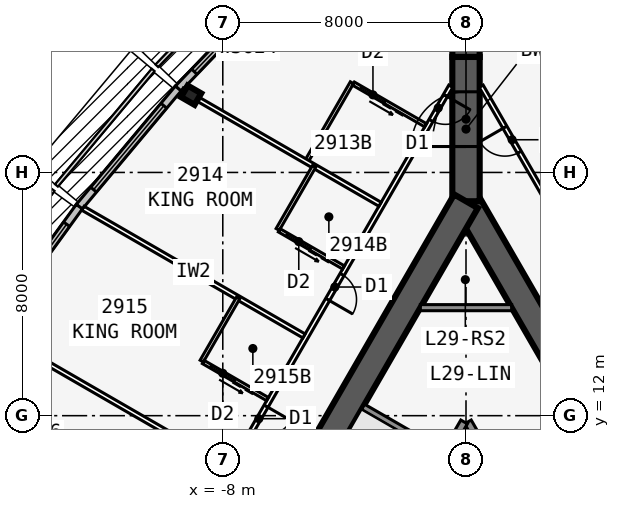
"""IFC4 building model, lengths in metres.
Left out: names, types, materials, properties, quantities, classifications, styles, units other than length and angle.
Written with IfcOpenShell. Run it as: python <this file> out.ifc"""

import sys

from ifc_helpers import new_model, si_unit, direction, frame, frame_2d, origin, origin_2d, place, context, subcontext, project, spatial, rectangle, i_section, extrude, element, fill, save


model = new_model("IFC4")
c1 = context("Model", 3, precision=1e-05, world=origin(), true_north=direction((0.0, 1.0)))
c2 = subcontext(c1, "Body", "Model", "MODEL_VIEW")
j1 = project(units=[si_unit("LENGTHUNIT", "METRE"), si_unit("PLANEANGLEUNIT", "RADIAN")], contexts=[c1])
p1 = place(None, origin())
s1 = spatial("IfcSite", under=j1, at=p1, CompositionType="ELEMENT")
p2 = place(p1, origin())
s2 = spatial("IfcBuilding", under=s1, at=p2, CompositionType="ELEMENT")
p3 = place(p2, frame((0.0, 0.0, 114.7)))
s3 = spatial("IfcBuildingStorey", under=s2, at=p3, CompositionType="ELEMENT", Elevation=114.7)
p4 = place(p3, frame((16.5, -9.526, 0.0), z_axis=(0.0, 0.0, 1.0), x_axis=(-0.499999749417, 0.866025548458, 0.0)))
e1 = element("IfcWall", 1, at=p4, inside=s3, PredefinedType="SHEAR", context=c2, shape_type="SweptSolid", body=[
    extrude(rectangle(XDim=33.0, YDim=0.9, at=frame_2d((16.5, 0.0))), origin(), (0.0, 0.0, 1.0), 3.4),
])
p5 = place(p4, frame((14.15, 0.0, 0.0)))
e2 = element("IfcOpeningElement", 2, at=p5, cuts=e1, PredefinedType="OPENING", context=c2, shape_type="SweptSolid", body=[
    extrude(rectangle(XDim=1.8, YDim=2.13, at=frame_2d((0.9, 1.065))), frame((0.0, 0.46, 0.0), z_axis=(0.0, -1.0, 0.0), x_axis=(1.0, 0.0, 0.0)), (0.0, 0.0, 1.0), 0.92),
])
p6 = place(p4, frame((12.6, 0.0, 0.0)))
e3 = element("IfcOpeningElement", 3, at=p6, cuts=e1, PredefinedType="OPENING", context=c2, shape_type="SweptSolid", body=[
    extrude(rectangle(XDim=1.0, YDim=2.13, at=frame_2d((0.5, 1.065))), frame((0.0, 0.46, 0.0), z_axis=(0.0, -1.0, 0.0), x_axis=(1.0, 0.0, 0.0)), (0.0, 0.0, 1.0), 0.92),
])
p7 = place(p3, frame((5.379, 2.586, 0.0), z_axis=(0.0, 0.0, 1.0), x_axis=(-0.500001375892, 0.866024609411, 0.0)))
e4 = element("IfcWall", 4, at=p7, inside=s3, PredefinedType="SOLIDWALL", context=c2, shape_type="SweptSolid", body=[
    extrude(rectangle(XDim=10.633, YDim=0.25, at=frame_2d((5.316, 0.0))), origin(), (0.0, 0.0, 1.0), 3.235),
])
p8 = place(p7, frame((9.164, 0.0, 0.0)))
e5 = element("IfcOpeningElement", 5, at=p8, cuts=e4, PredefinedType="OPENING", context=c2, shape_type="SweptSolid", body=[
    extrude(rectangle(XDim=0.9, YDim=2.13, at=frame_2d((0.45, 1.065))), frame((0.0, 0.135, 0.0), z_axis=(0.0, -1.0, 0.0), x_axis=(1.0, 0.0, 0.0)), (0.0, 0.0, 1.0), 0.27),
])
p9 = place(p7, frame((1.0, 0.0, 0.0)))
e6 = element("IfcOpeningElement", 6, at=p9, cuts=e4, PredefinedType="OPENING", context=c2, shape_type="SweptSolid", body=[
    extrude(rectangle(XDim=1.1, YDim=2.13, at=frame_2d((0.55, 1.065))), frame((0.0, 0.135, 0.0), z_axis=(0.0, -1.0, 0.0), x_axis=(1.0, 0.0, 0.0)), (0.0, 0.0, 1.0), 0.27),
])
p10 = place(p7, frame((3.9, 0.0, 0.0)))
e7 = element("IfcOpeningElement", 7, at=p10, cuts=e4, PredefinedType="OPENING", context=c2, shape_type="SweptSolid", body=[
    extrude(rectangle(XDim=1.1, YDim=2.13, at=frame_2d((0.55, 1.065))), frame((0.0, 0.135, 0.0), z_axis=(0.0, -1.0, 0.0), x_axis=(1.0, 0.0, 0.0)), (0.0, 0.0, 1.0), 0.27),
])
p11 = place(p7, frame((6.8, 0.0, 0.0)))
e8 = element("IfcOpeningElement", 8, at=p11, cuts=e4, PredefinedType="OPENING", context=c2, shape_type="SweptSolid", body=[
    extrude(rectangle(XDim=1.1, YDim=2.13, at=frame_2d((0.55, 1.065))), frame((0.0, 0.135, 0.0), z_axis=(0.0, -1.0, 0.0), x_axis=(1.0, 0.0, 0.0)), (0.0, 0.0, 1.0), 0.27),
])
p12 = place(p3, frame((0.979, 10.207, 0.0), z_axis=(0.0, 0.0, 1.0), x_axis=(0.866022959057, 0.500004234368, 0.0)))
e9 = element("IfcWall", 9, at=p12, inside=s3, PredefinedType="SOLIDWALL", context=c2, shape_type="SweptSolid", body=[
    extrude(rectangle(XDim=3.125, YDim=0.2, at=frame_2d((1.562, 0.0))), origin(), (0.0, 0.0, 1.0), 3.235),
])
p13 = place(p3, frame((0.0, 19.052, 0.0), z_axis=(0.0, 0.0, 1.0), x_axis=(-0.499999749417, -0.866025548458, 0.0)))
e10 = element("IfcWall", 10, at=p13, inside=s3, PredefinedType="SHEAR", context=c2, shape_type="SweptSolid", body=[
    extrude(rectangle(XDim=33.0, YDim=0.9, at=frame_2d((16.5, 0.0))), origin(), (0.0, 0.0, 1.0), 3.4),
])
p14 = place(p13, frame((14.15, 0.0, 0.0)))
e11 = element("IfcOpeningElement", 11, at=p14, cuts=e10, PredefinedType="OPENING", context=c2, shape_type="SweptSolid", body=[
    extrude(rectangle(XDim=1.8, YDim=2.13, at=frame_2d((0.9, 1.065))), frame((0.0, 0.46, 0.0), z_axis=(0.0, -1.0, 0.0), x_axis=(1.0, 0.0, 0.0)), (0.0, 0.0, 1.0), 0.92),
])
p15 = place(p13, frame((12.6, 0.0, 0.0)))
e12 = element("IfcOpeningElement", 12, at=p15, cuts=e10, PredefinedType="OPENING", context=c2, shape_type="SweptSolid", body=[
    extrude(rectangle(XDim=1.0, YDim=2.13, at=frame_2d((0.5, 1.065))), frame((0.0, 0.46, 0.0), z_axis=(0.0, -1.0, 0.0), x_axis=(1.0, 0.0, 0.0)), (0.0, 0.0, 1.0), 0.92),
])
p16 = place(p3, frame((-0.062, 11.794, 0.0), z_axis=(0.0, 0.0, 1.0), x_axis=(-0.500006680225, -0.86602154692, 0.0)))
e13 = element("IfcWall", 13, at=p16, inside=s3, PredefinedType="SOLIDWALL", context=c2, shape_type="SweptSolid", body=[
    extrude(rectangle(XDim=7.733, YDim=0.25, at=frame_2d((3.866, 0.0))), origin(), (0.0, 0.0, 1.0), 3.235),
])
p17 = place(p3, frame((-0.679, 10.727, 0.0), z_axis=(0.0, 0.0, 1.0), x_axis=(-0.866022959057, 0.500004234368, 0.0)))
e14 = element("IfcWall", 14, at=p17, inside=s3, PredefinedType="SOLIDWALL", context=c2, shape_type="SweptSolid", body=[
    extrude(rectangle(XDim=3.125, YDim=0.2, at=frame_2d((1.562, 0.0))), origin(), (0.0, 0.0, 1.0), 3.235),
])
p18 = place(p3, frame((0.0, 19.052, 0.0), z_axis=(0.0, 0.0, 1.0), x_axis=(0.0, 1.0, 0.0)))
e15 = element("IfcWall", 15, at=p18, inside=s3, PredefinedType="SHEAR", context=c2, shape_type="SweptSolid", body=[
    extrude(rectangle(XDim=4.746, YDim=0.9, at=frame_2d((2.373, 0.0))), origin(), (0.0, 0.0, 1.0), 3.4),
])
p19 = place(p18, frame((1.8, 0.0, 0.0)))
e16 = element("IfcOpeningElement", 16, at=p19, cuts=e15, PredefinedType="OPENING", context=c2, shape_type="SweptSolid", body=[
    extrude(rectangle(XDim=1.8, YDim=2.13, at=frame_2d((0.9, 1.065))), frame((0.0, 0.46, 0.0), z_axis=(0.0, -1.0, 0.0), x_axis=(1.0, 0.0, 0.0)), (0.0, 0.0, 1.0), 0.92),
])
p20 = place(p3, frame((0.0, 23.799, 0.0), z_axis=(0.0, 0.0, 1.0), x_axis=(0.0, 1.0, 0.0)))
e17 = element("IfcWall", 17, at=p20, inside=s3, PredefinedType="SHEAR", context=c2, shape_type="SweptSolid", body=[
    extrude(rectangle(XDim=1.155, YDim=0.9, at=frame_2d((0.577, 0.0))), origin(), (0.0, 0.0, 1.0), 3.4),
])
p21 = place(p3, frame((-9.041, 22.541, 0.0), z_axis=(0.0, 0.0, 1.0), x_axis=(-0.5, -0.866025403784, 0.0)))
e18 = element("IfcColumn", 18, at=p21, inside=s3, PredefinedType="COLUMN", context=c2, shape_type="SweptSolid", body=[
    extrude(i_section(OverallWidth=0.437, OverallDepth=0.513, WebThickness=0.061, FlangeThickness=0.097, at=origin_2d()), origin(), (0.0, 0.0, 1.0), 3.4),
])
p22 = place(p3, frame((-5.91, 26.472, 0.0), z_axis=(0.0, 0.0, 1.0), x_axis=(-0.691719937936, -0.722165858693, 0.0)))
e19 = element("IfcWall", 19, at=p22, inside=s3, PredefinedType="STANDARD", context=c2, shape_type="SweptSolid", body=[
    extrude(rectangle(XDim=5.148, YDim=0.25, at=frame_2d((2.574, 0.0))), origin(), (0.0, 0.0, 1.0), 3.235),
])
p23 = place(p22, frame((0.774, 0.0, 0.45)))
e20 = element("IfcOpeningElement", 20, at=p23, cuts=e19, PredefinedType="OPENING", context=c2, shape_type="SweptSolid", body=[
    extrude(rectangle(XDim=3.6, YDim=2.4, at=frame_2d((1.8, 1.2))), frame((0.0, 0.135, 0.0), z_axis=(0.0, -1.0, 0.0), x_axis=(1.0, 0.0, 0.0)), (0.0, 0.0, 1.0), 0.27),
])
p24 = place(p3, frame((-9.465, 22.76, 0.0), z_axis=(0.0, 0.0, 1.0), x_axis=(-0.641810386606, -0.766863369607, 0.0)))
e21 = element("IfcWall", 21, at=p24, inside=s3, PredefinedType="STANDARD", context=c2, shape_type="SweptSolid", body=[
    extrude(rectangle(XDim=5.076, YDim=0.25, at=frame_2d((2.538, 0.0))), origin(), (0.0, 0.0, 1.0), 3.235),
])
p25 = place(p24, frame((0.738, 0.0, 0.45)))
e22 = element("IfcOpeningElement", 22, at=p25, cuts=e21, PredefinedType="OPENING", context=c2, shape_type="SweptSolid", body=[
    extrude(rectangle(XDim=3.6, YDim=2.4, at=frame_2d((1.8, 1.2))), frame((0.0, 0.135, 0.0), z_axis=(0.0, -1.0, 0.0), x_axis=(1.0, 0.0, 0.0)), (0.0, 0.0, 1.0), 0.27),
])
p26 = place(p3, frame((-12.718, 18.875, 0.0), z_axis=(0.0, 0.0, 1.0), x_axis=(-0.587669188412, -0.809101307001, 0.0)))
e23 = element("IfcWall", 23, at=p26, inside=s3, PredefinedType="STANDARD", context=c2, shape_type="SweptSolid", body=[
    extrude(rectangle(XDim=5.028, YDim=0.25, at=frame_2d((2.514, 0.0))), origin(), (0.0, 0.0, 1.0), 3.235),
])
p27 = place(p26, frame((0.714, 0.0, 0.45)))
e24 = element("IfcOpeningElement", 24, at=p27, cuts=e23, PredefinedType="OPENING", context=c2, shape_type="SweptSolid", body=[
    extrude(rectangle(XDim=3.6, YDim=2.4, at=frame_2d((1.8, 1.2))), frame((0.0, 0.135, 0.0), z_axis=(0.0, -1.0, 0.0), x_axis=(1.0, 0.0, 0.0)), (0.0, 0.0, 1.0), 0.27),
])
p28 = place(p3, frame((20.027, -10.985, 0.0), z_axis=(0.0, 0.0, 1.0), x_axis=(-0.500001677587, 0.866024435227, 0.0)))
e25 = element("IfcWall", 25, at=p28, inside=s3, PredefinedType="PARTITIONING", context=c2, shape_type="SweptSolid", body=[
    extrude(rectangle(XDim=39.054, YDim=0.15, at=frame_2d((19.527, 0.0))), origin(), (0.0, 0.0, 1.0), 3.235),
])
p29 = place(p28, frame((0.352, 0.0, 0.0)))
e26 = element("IfcOpeningElement", 26, at=p29, cuts=e25, PredefinedType="OPENING", context=c2, shape_type="SweptSolid", body=[
    extrude(rectangle(XDim=0.95, YDim=2.13, at=frame_2d((0.475, 1.065))), frame((0.0, 0.085, 0.0), z_axis=(0.0, -1.0, 0.0), x_axis=(1.0, 0.0, 0.0)), (0.0, 0.0, 1.0), 0.17),
])
p30 = place(p28, frame((7.752, 0.0, 0.0)))
e27 = element("IfcOpeningElement", 27, at=p30, cuts=e25, PredefinedType="OPENING", context=c2, shape_type="SweptSolid", body=[
    extrude(rectangle(XDim=0.95, YDim=2.13, at=frame_2d((0.475, 1.065))), frame((0.0, 0.085, 0.0), z_axis=(0.0, -1.0, 0.0), x_axis=(1.0, 0.0, 0.0)), (0.0, 0.0, 1.0), 0.17),
])
p31 = place(p28, frame((17.752, 0.0, 0.0)))
e28 = element("IfcOpeningElement", 28, at=p31, cuts=e25, PredefinedType="OPENING", context=c2, shape_type="SweptSolid", body=[
    extrude(rectangle(XDim=0.95, YDim=2.13, at=frame_2d((0.475, 1.065))), frame((0.0, 0.085, 0.0), z_axis=(0.0, -1.0, 0.0), x_axis=(1.0, 0.0, 0.0)), (0.0, 0.0, 1.0), 0.17),
])
p32 = place(p28, frame((22.152, 0.0, 0.0)))
e29 = element("IfcOpeningElement", 29, at=p32, cuts=e25, PredefinedType="OPENING", context=c2, shape_type="SweptSolid", body=[
    extrude(rectangle(XDim=0.95, YDim=2.13, at=frame_2d((0.475, 1.065))), frame((0.0, 0.085, 0.0), z_axis=(0.0, -1.0, 0.0), x_axis=(1.0, 0.0, 0.0)), (0.0, 0.0, 1.0), 0.17),
])
p33 = place(p28, frame((27.152, 0.0, 0.0)))
e30 = element("IfcOpeningElement", 30, at=p33, cuts=e25, PredefinedType="OPENING", context=c2, shape_type="SweptSolid", body=[
    extrude(rectangle(XDim=0.95, YDim=2.13, at=frame_2d((0.475, 1.065))), frame((0.0, 0.085, 0.0), z_axis=(0.0, -1.0, 0.0), x_axis=(1.0, 0.0, 0.0)), (0.0, 0.0, 1.0), 0.17),
])
p34 = place(p28, frame((36.546, 0.0, 0.0)))
e31 = element("IfcOpeningElement", 31, at=p34, cuts=e25, PredefinedType="OPENING", context=c2, shape_type="SweptSolid", body=[
    extrude(rectangle(XDim=0.95, YDim=2.13, at=frame_2d((0.475, 1.065))), frame((0.0, 0.085, 0.0), z_axis=(0.0, -1.0, 0.0), x_axis=(1.0, 0.0, 0.0)), (0.0, 0.0, 1.0), 0.17),
])
p35 = place(p3, frame((-0.5, 22.836, 0.0), z_axis=(0.0, 0.0, 1.0), x_axis=(-0.500001677587, -0.866024435227, 0.0)))
e32 = element("IfcWall", 32, at=p35, inside=s3, PredefinedType="PARTITIONING", context=c2, shape_type="SweptSolid", body=[
    extrude(rectangle(XDim=39.054, YDim=0.15, at=frame_2d((19.527, 0.0))), origin(), (0.0, 0.0, 1.0), 3.235),
])
p36 = place(p35, frame((0.352, 0.0, 0.0)))
e33 = element("IfcOpeningElement", 33, at=p36, cuts=e32, PredefinedType="OPENING", context=c2, shape_type="SweptSolid", body=[
    extrude(rectangle(XDim=0.95, YDim=2.13, at=frame_2d((0.475, 1.065))), frame((0.0, 0.085, 0.0), z_axis=(0.0, -1.0, 0.0), x_axis=(1.0, 0.0, 0.0)), (0.0, 0.0, 1.0), 0.17),
])
p37 = place(p35, frame((7.152, 0.0, 0.0)))
e34 = element("IfcOpeningElement", 34, at=p37, cuts=e32, PredefinedType="OPENING", context=c2, shape_type="SweptSolid", body=[
    extrude(rectangle(XDim=0.95, YDim=2.13, at=frame_2d((0.475, 1.065))), frame((0.0, 0.085, 0.0), z_axis=(0.0, -1.0, 0.0), x_axis=(1.0, 0.0, 0.0)), (0.0, 0.0, 1.0), 0.17),
])
p38 = place(p35, frame((12.152, 0.0, 0.0)))
e35 = element("IfcOpeningElement", 35, at=p38, cuts=e32, PredefinedType="OPENING", context=c2, shape_type="SweptSolid", body=[
    extrude(rectangle(XDim=0.95, YDim=2.13, at=frame_2d((0.475, 1.065))), frame((0.0, 0.085, 0.0), z_axis=(0.0, -1.0, 0.0), x_axis=(1.0, 0.0, 0.0)), (0.0, 0.0, 1.0), 0.17),
])
p39 = place(p35, frame((17.152, 0.0, 0.0)))
e36 = element("IfcOpeningElement", 36, at=p39, cuts=e32, PredefinedType="OPENING", context=c2, shape_type="SweptSolid", body=[
    extrude(rectangle(XDim=0.95, YDim=2.13, at=frame_2d((0.475, 1.065))), frame((0.0, 0.085, 0.0), z_axis=(0.0, -1.0, 0.0), x_axis=(1.0, 0.0, 0.0)), (0.0, 0.0, 1.0), 0.17),
])
p40 = place(p35, frame((22.752, 0.0, 0.0)))
e37 = element("IfcOpeningElement", 37, at=p40, cuts=e32, PredefinedType="OPENING", context=c2, shape_type="SweptSolid", body=[
    extrude(rectangle(XDim=0.95, YDim=2.13, at=frame_2d((0.475, 1.065))), frame((0.0, 0.085, 0.0), z_axis=(0.0, -1.0, 0.0), x_axis=(1.0, 0.0, 0.0)), (0.0, 0.0, 1.0), 0.17),
])
p41 = place(p35, frame((32.152, 0.0, 0.0)))
e38 = element("IfcOpeningElement", 38, at=p41, cuts=e32, PredefinedType="OPENING", context=c2, shape_type="SweptSolid", body=[
    extrude(rectangle(XDim=0.95, YDim=2.13, at=frame_2d((0.475, 1.065))), frame((0.0, 0.085, 0.0), z_axis=(0.0, -1.0, 0.0), x_axis=(1.0, 0.0, 0.0)), (0.0, 0.0, 1.0), 0.17),
])
p42 = place(p35, frame((37.752, 0.0, 0.0)))
e39 = element("IfcOpeningElement", 39, at=p42, cuts=e32, PredefinedType="OPENING", context=c2, shape_type="SweptSolid", body=[
    extrude(rectangle(XDim=0.95, YDim=2.13, at=frame_2d((0.475, 1.065))), frame((0.0, 0.085, 0.0), z_axis=(0.0, -1.0, 0.0), x_axis=(1.0, 0.0, 0.0)), (0.0, 0.0, 1.0), 0.17),
])
p43 = place(p3, frame((-2.829, 18.954, 0.0), z_axis=(0.0, 0.0, 1.0), x_axis=(-0.866015739374, 0.500016738876, 0.0)))
e40 = element("IfcWall", 40, at=p43, inside=s3, PredefinedType="PARTITIONING", context=c2, shape_type="SweptSolid", body=[
    extrude(rectangle(XDim=7.516, YDim=0.15, at=frame_2d((3.758, 0.0))), origin(), (0.0, 0.0, 1.0), 2.389),
])
p44 = place(p3, frame((-5.329, 14.623, 0.0), z_axis=(0.0, 0.0, 1.0), x_axis=(-0.866011723728, 0.500023693804, 0.0)))
e41 = element("IfcWall", 41, at=p44, inside=s3, PredefinedType="PARTITIONING", context=c2, shape_type="SweptSolid", body=[
    extrude(rectangle(XDim=8.395, YDim=0.15, at=frame_2d((4.198, 0.0))), origin(), (0.0, 0.0, 1.0), 2.389),
])
p45 = place(p3, frame((-7.829, 10.293, 0.0), z_axis=(0.0, 0.0, 1.0), x_axis=(-0.866027015393, 0.499997208602, 0.0)))
e42 = element("IfcWall", 42, at=p45, inside=s3, PredefinedType="PARTITIONING", context=c2, shape_type="SweptSolid", body=[
    extrude(rectangle(XDim=8.922, YDim=0.15, at=frame_2d((4.461, 0.0))), origin(), (0.0, 0.0, 1.0), 2.389),
])
p46 = place(p3, frame((-3.753, 22.952, 0.0), z_axis=(0.0, 0.0, 1.0), x_axis=(-0.499990139034, -0.866031096941, 0.0)))
e43 = element("IfcWall", 43, at=p46, inside=s3, PredefinedType="PLUMBINGWALL", context=c2, shape_type="SweptSolid", body=[
    extrude(rectangle(XDim=3.0, YDim=0.12, at=frame_2d((1.5, 0.0))), origin(), (0.0, 0.0, 1.0), 3.235),
])
p47 = place(p3, frame((-1.329, 21.552, 0.0), z_axis=(0.0, 0.0, 1.0), x_axis=(-0.865997131366, 0.500048966069, 0.0)))
e44 = element("IfcWall", 44, at=p47, inside=s3, PredefinedType="PLUMBINGWALL", context=c2, shape_type="SweptSolid", body=[
    extrude(rectangle(XDim=2.74, YDim=0.12, at=frame_2d((1.37, 0.0))), origin(), (0.0, 0.0, 1.0), 3.235),
])
p48 = place(p47, frame((1.55, 0.0, 0.0)))
e45 = element("IfcOpeningElement", 45, at=p48, cuts=e44, PredefinedType="OPENING", context=c2, shape_type="SweptSolid", body=[
    extrude(rectangle(XDim=0.9, YDim=2.13, at=frame_2d((0.45, 1.065))), frame((0.0, 0.07, 0.0), z_axis=(0.0, -1.0, 0.0), x_axis=(1.0, 0.0, 0.0)), (0.0, 0.0, 1.0), 0.14),
])
p49 = place(p3, frame((-4.993, 20.204, 0.0), z_axis=(0.0, 0.0, 1.0), x_axis=(-0.500033551112, -0.866006032174, 0.0)))
e46 = element("IfcWall", 46, at=p49, inside=s3, PredefinedType="PLUMBINGWALL", context=c2, shape_type="SweptSolid", body=[
    extrude(rectangle(XDim=2.4, YDim=0.12, at=frame_2d((1.2, 0.0))), origin(), (0.0, 0.0, 1.0), 3.235),
])
p50 = place(p3, frame((-4.029, 16.875, 0.0), z_axis=(0.0, 0.0, 1.0), x_axis=(-0.865980627057, 0.500077547548, 0.0)))
e47 = element("IfcWall", 47, at=p50, inside=s3, PredefinedType="PLUMBINGWALL", context=c2, shape_type="SweptSolid", body=[
    extrude(rectangle(XDim=2.44, YDim=0.12, at=frame_2d((1.22, 0.0))), origin(), (0.0, 0.0, 1.0), 3.235),
])
p51 = place(p50, frame((1.25, 0.0, 0.0)))
e48 = element("IfcOpeningElement", 48, at=p51, cuts=e47, PredefinedType="OPENING", context=c2, shape_type="SweptSolid", body=[
    extrude(rectangle(XDim=0.9, YDim=2.13, at=frame_2d((0.45, 1.065))), frame((0.0, 0.07, 0.0), z_axis=(0.0, -1.0, 0.0), x_axis=(1.0, 0.0, 0.0)), (0.0, 0.0, 1.0), 0.14),
])
p52 = place(p3, frame((-7.493, 15.873, 0.0), z_axis=(0.0, 0.0, 1.0), x_axis=(-0.500077600433, -0.865980596518, 0.0)))
e49 = element("IfcWall", 49, at=p52, inside=s3, PredefinedType="PLUMBINGWALL", context=c2, shape_type="SweptSolid", body=[
    extrude(rectangle(XDim=2.4, YDim=0.12, at=frame_2d((1.2, 0.0))), origin(), (0.0, 0.0, 1.0), 3.235),
])
p53 = place(p3, frame((-6.529, 12.545, 0.0), z_axis=(0.0, 0.0, 1.0), x_axis=(-0.866023955769, 0.500002508028, 0.0)))
e50 = element("IfcWall", 50, at=p53, inside=s3, PredefinedType="PLUMBINGWALL", context=c2, shape_type="SweptSolid", body=[
    extrude(rectangle(XDim=2.44, YDim=0.12, at=frame_2d((1.22, 0.0))), origin(), (0.0, 0.0, 1.0), 3.235),
])
p54 = place(p53, frame((1.25, 0.0, 0.0)))
e51 = element("IfcOpeningElement", 51, at=p54, cuts=e50, PredefinedType="OPENING", context=c2, shape_type="SweptSolid", body=[
    extrude(rectangle(XDim=0.9, YDim=2.13, at=frame_2d((0.45, 1.065))), frame((0.0, 0.07, 0.0), z_axis=(0.0, -1.0, 0.0), x_axis=(1.0, 0.0, 0.0)), (0.0, 0.0, 1.0), 0.14),
])
p55 = place(p3, frame((-9.993, 11.543, 0.0), z_axis=(0.0, 0.0, 1.0), x_axis=(-0.500077600433, -0.865980596518, 0.0)))
e52 = element("IfcWall", 52, at=p55, inside=s3, PredefinedType="PLUMBINGWALL", context=c2, shape_type="SweptSolid", body=[
    extrude(rectangle(XDim=2.4, YDim=0.12, at=frame_2d((1.2, 0.0))), origin(), (0.0, 0.0, 1.0), 3.235),
])
p56 = place(p3, frame((-1.501, 15.552, 0.0), z_axis=(0.0, 0.0, 1.0), x_axis=(1.0, 0.0, 0.0)))
e53 = element("IfcWall", 53, at=p56, inside=s3, PredefinedType="SOLIDWALL", context=c2, shape_type="SweptSolid", body=[
    extrude(rectangle(XDim=3.002, YDim=0.2, at=frame_2d((1.501, 0.0))), origin(), (0.0, 0.0, 1.0), 3.235),
])
p57 = place(p23, origin())
e54 = element("IfcWindow", 54, at=p57, inside=s3, PartitioningType="SINGLE_PANEL", PredefinedType="WINDOW", context=c2, shape_type="SweptSolid", body=[
    extrude(rectangle(XDim=3.6, YDim=2.4, at=frame_2d((1.8, 1.2))), frame((0.0, 0.03, 0.0), z_axis=(0.0, -1.0, 0.0), x_axis=(1.0, 0.0, 0.0)), (0.0, 0.0, 1.0), 0.06),
])
fill(e20, e54)
p58 = place(p25, origin())
e55 = element("IfcWindow", 55, at=p58, inside=s3, PartitioningType="SINGLE_PANEL", PredefinedType="WINDOW", context=c2, shape_type="SweptSolid", body=[
    extrude(rectangle(XDim=3.6, YDim=2.4, at=frame_2d((1.8, 1.2))), frame((0.0, 0.03, 0.0), z_axis=(0.0, -1.0, 0.0), x_axis=(1.0, 0.0, 0.0)), (0.0, 0.0, 1.0), 0.06),
])
fill(e22, e55)
p59 = place(p27, origin())
e56 = element("IfcWindow", 56, at=p59, inside=s3, PartitioningType="SINGLE_PANEL", PredefinedType="WINDOW", context=c2, shape_type="SweptSolid", body=[
    extrude(rectangle(XDim=3.6, YDim=2.4, at=frame_2d((1.8, 1.2))), frame((0.0, 0.03, 0.0), z_axis=(0.0, -1.0, 0.0), x_axis=(1.0, 0.0, 0.0)), (0.0, 0.0, 1.0), 0.06),
])
fill(e24, e56)
p60 = place(p34, origin())
e57 = element("IfcDoor", 57, at=p60, inside=s3, OperationType="SINGLE_SWING_RIGHT", PredefinedType="DOOR", context=c2, shape_type="SweptSolid", body=[
    extrude(rectangle(XDim=0.95, YDim=2.13, at=frame_2d((0.475, 1.065))), frame((0.0, 0.025, 0.0), z_axis=(0.0, -1.0, 0.0), x_axis=(1.0, 0.0, 0.0)), (0.0, 0.0, 1.0), 0.05),
])
fill(e31, e57)
p61 = place(p48, origin())
e58 = element("IfcDoor", 58, at=p61, inside=s3, OperationType="SLIDING_TO_LEFT", PredefinedType="DOOR", context=c2, shape_type="SweptSolid", body=[
    extrude(rectangle(XDim=0.9, YDim=2.13, at=frame_2d((0.45, 1.065))), frame((0.0, 0.025, 0.0), z_axis=(0.0, -1.0, 0.0), x_axis=(1.0, 0.0, 0.0)), (0.0, 0.0, 1.0), 0.05),
])
fill(e45, e58)
p62 = place(p36, origin())
e59 = element("IfcDoor", 59, at=p62, inside=s3, OperationType="SINGLE_SWING_LEFT", PredefinedType="DOOR", context=c2, shape_type="SweptSolid", body=[
    extrude(rectangle(XDim=0.95, YDim=2.13, at=frame_2d((0.475, 1.065))), frame((0.0, 0.025, 0.0), z_axis=(0.0, -1.0, 0.0), x_axis=(1.0, 0.0, 0.0)), (0.0, 0.0, 1.0), 0.05),
])
fill(e33, e59)
p63 = place(p51, origin())
e60 = element("IfcDoor", 60, at=p63, inside=s3, OperationType="SLIDING_TO_LEFT", PredefinedType="DOOR", context=c2, shape_type="SweptSolid", body=[
    extrude(rectangle(XDim=0.9, YDim=2.13, at=frame_2d((0.45, 1.065))), frame((0.0, 0.025, 0.0), z_axis=(0.0, -1.0, 0.0), x_axis=(1.0, 0.0, 0.0)), (0.0, 0.0, 1.0), 0.05),
])
fill(e48, e60)
p64 = place(p37, origin())
e61 = element("IfcDoor", 61, at=p64, inside=s3, OperationType="SINGLE_SWING_RIGHT", PredefinedType="DOOR", context=c2, shape_type="SweptSolid", body=[
    extrude(rectangle(XDim=0.95, YDim=2.13, at=frame_2d((0.475, 1.065))), frame((0.0, 0.025, 0.0), z_axis=(0.0, -1.0, 0.0), x_axis=(1.0, 0.0, 0.0)), (0.0, 0.0, 1.0), 0.05),
])
fill(e34, e61)
p65 = place(p54, origin())
e62 = element("IfcDoor", 62, at=p65, inside=s3, OperationType="SLIDING_TO_LEFT", PredefinedType="DOOR", context=c2, shape_type="SweptSolid", body=[
    extrude(rectangle(XDim=0.9, YDim=2.13, at=frame_2d((0.45, 1.065))), frame((0.0, 0.025, 0.0), z_axis=(0.0, -1.0, 0.0), x_axis=(1.0, 0.0, 0.0)), (0.0, 0.0, 1.0), 0.05),
])
fill(e51, e62)
p66 = place(p38, origin())
e63 = element("IfcDoor", 63, at=p66, inside=s3, OperationType="SINGLE_SWING_LEFT", PredefinedType="DOOR", context=c2, shape_type="SweptSolid", body=[
    extrude(rectangle(XDim=0.95, YDim=2.13, at=frame_2d((0.475, 1.065))), frame((0.0, 0.025, 0.0), z_axis=(0.0, -1.0, 0.0), x_axis=(1.0, 0.0, 0.0)), (0.0, 0.0, 1.0), 0.05),
])
fill(e35, e63)
p67 = place(p19, origin())
e64 = element("IfcDoor", 64, at=p67, inside=s3, OperationType="DOUBLE_DOOR_DOUBLE_SWING", PredefinedType="DOOR", context=c2, shape_type="SweptSolid", body=[
    extrude(rectangle(XDim=1.8, YDim=2.13, at=frame_2d((0.9, 1.065))), frame((0.0, 0.025, 0.0), z_axis=(0.0, -1.0, 0.0), x_axis=(1.0, 0.0, 0.0)), (0.0, 0.0, 1.0), 0.05),
])
fill(e16, e64)
save(model, sys.argv[1])
